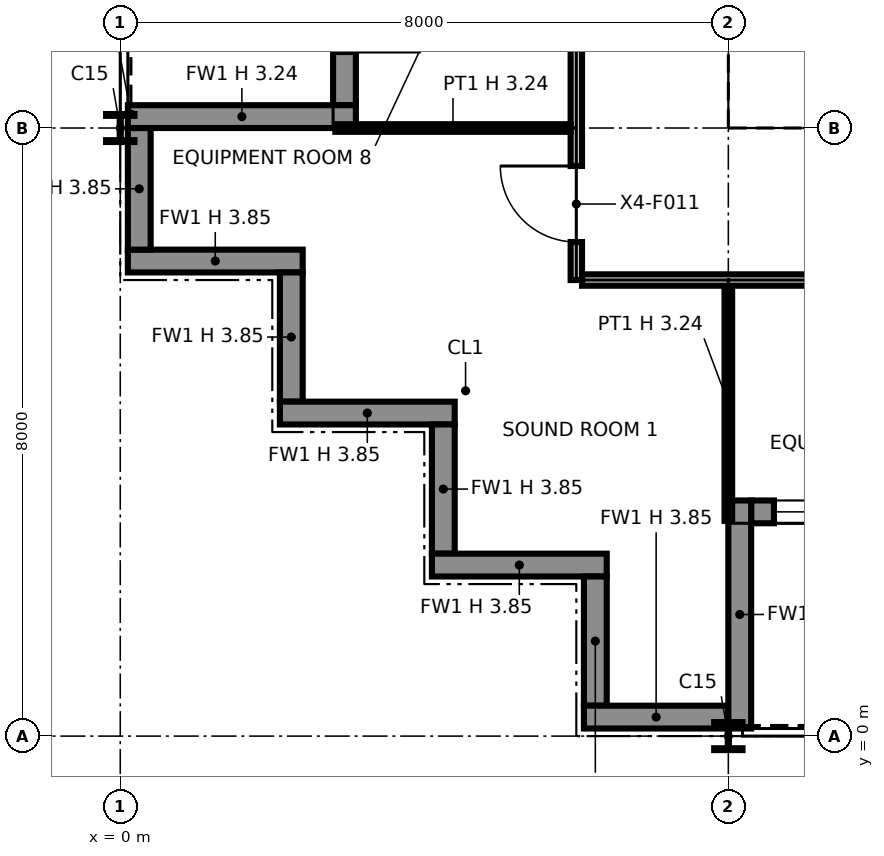
"""IFC4 building model, lengths in metres.
Left out: names, types, materials, properties, quantities, classifications, styles, units other than length and angle.
Written with IfcOpenShell. Run it as: python <this file> out.ifc"""

import sys

from ifc_helpers import new_model, si_unit, direction, frame, frame_2d, origin, origin_2d, place, context, subcontext, project, spatial, polyline, rectangle, i_section, outline, extrude, element, fill, save


model = new_model("IFC4")
c1 = context("Model", 3, precision=1e-05, world=origin(), true_north=direction((0.0, 1.0)))
c2 = subcontext(c1, "Body", "Model", "MODEL_VIEW")
j1 = project(units=[si_unit("LENGTHUNIT", "METRE"), si_unit("PLANEANGLEUNIT", "RADIAN")], contexts=[c1])
p1 = place(None, origin())
s1 = spatial("IfcSite", under=j1, at=p1, CompositionType="ELEMENT")
p2 = place(p1, origin())
s2 = spatial("IfcBuilding", under=s1, at=p2, CompositionType="ELEMENT")
p3 = place(p2, frame((0.0, 0.0, 275.0)))
s3 = spatial("IfcBuildingStorey", under=s2, at=p3, CompositionType="ELEMENT", Elevation=275.0)
for number, where, z_axis, x_axis in (
    (1, (0.0, 8.0, 0.0), (0.0, 0.0, 1.0), (1.0, 0.0, 0.0)),
    (2, (8.0, 0.0, 0.0), (0.0, 0.0, 1.0), (1.0, 0.0, 0.0)),
):
    element("IfcColumn", number, at=place(p3, frame(where, z_axis=z_axis, x_axis=x_axis)), inside=s3, PredefinedType="COLUMN", context=c2, shape_type="SweptSolid", body=[
        extrude(i_section(OverallWidth=0.373, OverallDepth=0.368, WebThickness=0.015, FlangeThickness=0.024, at=origin_2d()), origin(), (0.0, 0.0, 1.0), 3.85),
    ])
p4 = place(p3, frame((8.0, 8.0, 0.0), z_axis=(0.0, 0.0, 1.0), x_axis=(1.0, 0.0, 0.0)))
e3 = element("IfcColumn", 3, at=p4, inside=s3, PredefinedType="COLUMN", context=c2, shape_type="SweptSolid", body=[
    extrude(i_section(OverallWidth=0.257, OverallDepth=0.363, WebThickness=0.013, FlangeThickness=0.022, at=origin_2d()), origin(), (0.0, 0.0, 1.0), 3.85),
])
p5 = place(p3, frame((0.1, 6.25, 0.0), z_axis=(0.0, 0.0, 1.0), x_axis=(1.0, 0.0, 0.0)))
e4 = element("IfcWall", 4, at=p5, inside=s3, PredefinedType="SOLIDWALL", context=c2, shape_type="SweptSolid", body=[
    extrude(rectangle(XDim=2.3, YDim=0.3, at=frame_2d((1.15, 0.0))), origin(), (0.0, 0.0, 1.0), 3.85),
])
p6 = place(p3, frame((2.25, 6.1, 0.0), z_axis=(0.0, 0.0, 1.0), x_axis=(0.0, -1.0, 0.0)))
e5 = element("IfcWall", 5, at=p6, inside=s3, PredefinedType="SOLIDWALL", context=c2, shape_type="SweptSolid", body=[
    extrude(rectangle(XDim=1.7, YDim=0.3, at=frame_2d((0.85, 0.0))), origin(), (0.0, 0.0, 1.0), 3.85),
])
p7 = place(p3, frame((2.1, 4.25, 0.0), z_axis=(0.0, 0.0, 1.0), x_axis=(1.0, 0.0, 0.0)))
e6 = element("IfcWall", 6, at=p7, inside=s3, PredefinedType="SOLIDWALL", context=c2, shape_type="SweptSolid", body=[
    extrude(rectangle(XDim=2.3, YDim=0.3, at=frame_2d((1.15, 0.0))), origin(), (0.0, 0.0, 1.0), 3.85),
])
p8 = place(p3, frame((4.25, 4.1, 0.0), z_axis=(0.0, 0.0, 1.0), x_axis=(0.0, -1.0, 0.0)))
e7 = element("IfcWall", 7, at=p8, inside=s3, PredefinedType="SOLIDWALL", context=c2, shape_type="SweptSolid", body=[
    extrude(rectangle(XDim=1.7, YDim=0.3, at=frame_2d((0.85, 0.0))), origin(), (0.0, 0.0, 1.0), 3.85),
])
p9 = place(p3, frame((4.1, 2.25, 0.0), z_axis=(0.0, 0.0, 1.0), x_axis=(1.0, 0.0, 0.0)))
e8 = element("IfcWall", 8, at=p9, inside=s3, PredefinedType="SOLIDWALL", context=c2, shape_type="SweptSolid", body=[
    extrude(rectangle(XDim=2.3, YDim=0.3, at=frame_2d((1.15, 0.0))), origin(), (0.0, 0.0, 1.0), 3.85),
])
p10 = place(p3, frame((6.25, 2.1, 0.0), z_axis=(0.0, 0.0, 1.0), x_axis=(0.0, -1.0, 0.0)))
e9 = element("IfcWall", 9, at=p10, inside=s3, PredefinedType="SOLIDWALL", context=c2, shape_type="SweptSolid", body=[
    extrude(rectangle(XDim=1.7, YDim=0.3, at=frame_2d((0.85, 0.0))), origin(), (0.0, 0.0, 1.0), 3.85),
])
p11 = place(p3, frame((6.1, 0.25, 0.0), z_axis=(0.0, 0.0, 1.0), x_axis=(1.0, 0.0, 0.0)))
e10 = element("IfcWall", 10, at=p11, inside=s3, PredefinedType="SOLIDWALL", context=c2, shape_type="SweptSolid", body=[
    extrude(rectangle(XDim=1.9, YDim=0.3, at=frame_2d((0.95, 0.0))), origin(), (0.0, 0.0, 1.0), 3.85),
])
p12 = place(p3, frame((8.3, 2.95, 0.0), z_axis=(0.0, 0.0, 1.0), x_axis=(1.0, 0.0, 0.0)))
e11 = element("IfcWall", 11, at=p12, inside=s3, PredefinedType="SOLIDWALL", context=c2, shape_type="SweptSolid", body=[
    extrude(rectangle(XDim=7.4, YDim=0.3, at=frame_2d((3.7, 0.0))), origin(), (0.0, 0.0, 1.0), 3.85),
])
p13 = place(p12, frame((0.3, 0.0, 0.9)))
e12 = element("IfcOpeningElement", 12, at=p13, cuts=e11, PredefinedType="OPENING", context=c2, shape_type="SweptSolid", body=[
    extrude(rectangle(XDim=2.8, YDim=2.2, at=frame_2d((1.4, 1.1))), frame((0.0, 0.16, 0.0), z_axis=(0.0, -1.0, 0.0), x_axis=(1.0, 0.0, 0.0)), (0.0, 0.0, 1.0), 0.32),
])
p14 = place(p12, frame((4.7, 0.0, 0.0)))
e13 = element("IfcOpeningElement", 13, at=p14, cuts=e11, PredefinedType="OPENING", context=c2, shape_type="SweptSolid", body=[
    extrude(rectangle(XDim=2.0, YDim=2.4, at=frame_2d((1.0, 1.2))), frame((0.0, 0.16, 0.0), z_axis=(0.0, -1.0, 0.0), x_axis=(1.0, 0.0, 0.0)), (0.0, 0.0, 1.0), 0.32),
])
p15 = place(p3, frame((8.15, 0.1, 0.0), z_axis=(0.0, 0.0, 1.0), x_axis=(0.0, 1.0, 0.0)))
e14 = element("IfcWall", 14, at=p15, inside=s3, PredefinedType="SOLIDWALL", context=c2, shape_type="SweptSolid", body=[
    extrude(rectangle(XDim=3.0, YDim=0.3, at=frame_2d((1.5, 0.0))), origin(), (0.0, 0.0, 1.0), 3.237),
])
p16 = place(p3, frame((2.95, 15.7, 0.0), z_axis=(0.0, 0.0, 1.0), x_axis=(0.0, -1.0, 0.0)))
e15 = element("IfcWall", 15, at=p16, inside=s3, PredefinedType="SOLIDWALL", context=c2, shape_type="SweptSolid", body=[
    extrude(rectangle(XDim=7.4, YDim=0.3, at=frame_2d((3.7, 0.0))), origin(), (0.0, 0.0, 1.0), 3.85),
])
p17 = place(p16, frame((0.3, 0.0, 0.9)))
e16 = element("IfcOpeningElement", 16, at=p17, cuts=e15, PredefinedType="OPENING", context=c2, shape_type="SweptSolid", body=[
    extrude(rectangle(XDim=2.8, YDim=2.2, at=frame_2d((1.4, 1.1))), frame((0.0, 0.16, 0.0), z_axis=(0.0, -1.0, 0.0), x_axis=(1.0, 0.0, 0.0)), (0.0, 0.0, 1.0), 0.32),
])
p18 = place(p16, frame((4.7, 0.0, 0.0)))
e17 = element("IfcOpeningElement", 17, at=p18, cuts=e15, PredefinedType="OPENING", context=c2, shape_type="SweptSolid", body=[
    extrude(rectangle(XDim=2.0, YDim=2.4, at=frame_2d((1.0, 1.2))), frame((0.0, 0.16, 0.0), z_axis=(0.0, -1.0, 0.0), x_axis=(1.0, 0.0, 0.0)), (0.0, 0.0, 1.0), 0.32),
])
p19 = place(p3, frame((0.1, 8.15, 0.0), z_axis=(0.0, 0.0, 1.0), x_axis=(1.0, 0.0, 0.0)))
e18 = element("IfcWall", 18, at=p19, inside=s3, PredefinedType="SOLIDWALL", context=c2, shape_type="SweptSolid", body=[
    extrude(rectangle(XDim=3.0, YDim=0.3, at=frame_2d((1.5, 0.0))), origin(), (0.0, 0.0, 1.0), 3.237),
])
p20 = place(p3, frame((0.25, 8.0, 0.0), z_axis=(0.0, 0.0, 1.0), x_axis=(0.0, -1.0, 0.0)))
e19 = element("IfcWall", 19, at=p20, inside=s3, PredefinedType="SOLIDWALL", context=c2, shape_type="SweptSolid", body=[
    extrude(rectangle(XDim=1.6, YDim=0.3, at=frame_2d((0.8, 0.0))), origin(), (0.0, 0.0, 1.0), 3.85),
])
p21 = place(p3, frame((8.65, 8.75, 0.0), z_axis=(0.0, 0.0, 1.0), x_axis=(1.0, 0.0, 0.0)))
e20 = element("IfcWall", 20, at=p21, inside=s3, PredefinedType="PARTITIONING", context=c2, shape_type="SweptSolid", body=[
    extrude(outline(polyline([(0.0, 0.0), (14.7, 0.0), (14.7, 3.85), (7.438, 3.85), (7.437, 3.318), (7.263, 3.318), (7.262, 3.85), (0.0, 3.85), (0.0, 0.0)])), frame((0.0, 0.1, 0.0), z_axis=(0.0, -1.0, 0.0), x_axis=(1.0, 0.0, 0.0)), (0.0, 0.0, 1.0), 0.2),
])
p22 = place(p21, frame((1.3, 0.0, 0.0)))
e21 = element("IfcOpeningElement", 21, at=p22, cuts=e20, PredefinedType="OPENING", context=c2, shape_type="SweptSolid", body=[
    extrude(rectangle(XDim=1.4, YDim=2.1, at=frame_2d((0.7, 1.05))), frame((0.0, 0.11, 0.0), z_axis=(0.0, -1.0, 0.0), x_axis=(1.0, 0.0, 0.0)), (0.0, 0.0, 1.0), 0.22),
])
p23 = place(p21, frame((4.6, 0.0, 0.0)))
e22 = element("IfcOpeningElement", 22, at=p23, cuts=e20, PredefinedType="OPENING", context=c2, shape_type="SweptSolid", body=[
    extrude(rectangle(XDim=1.4, YDim=2.1, at=frame_2d((0.7, 1.05))), frame((0.0, 0.11, 0.0), z_axis=(0.0, -1.0, 0.0), x_axis=(1.0, 0.0, 0.0)), (0.0, 0.0, 1.0), 0.22),
])
p24 = place(p21, frame((10.4, 0.0, 0.0)))
e23 = element("IfcOpeningElement", 23, at=p24, cuts=e20, PredefinedType="OPENING", context=c2, shape_type="SweptSolid", body=[
    extrude(rectangle(XDim=1.2, YDim=2.1, at=frame_2d((0.6, 1.05))), frame((0.0, 0.11, 0.0), z_axis=(0.0, -1.0, 0.0), x_axis=(1.0, 0.0, 0.0)), (0.0, 0.0, 1.0), 0.22),
])
p25 = place(p3, frame((8.75, 8.85, 0.0), z_axis=(0.0, 0.0, 1.0), x_axis=(0.0, 1.0, 0.0)))
e24 = element("IfcWall", 24, at=p25, inside=s3, PredefinedType="PARTITIONING", context=c2, shape_type="SweptSolid", body=[
    extrude(outline(polyline([(0.0, 0.0), (14.3, 0.0), (14.3, 3.85), (10.225, 3.85), (10.224, 3.44), (10.076, 3.44), (10.075, 3.85), (7.238, 3.85), (7.237, 3.318), (7.063, 3.318), (7.062, 3.85), (0.0, 3.85), (0.0, 0.0)])), frame((0.0, 0.1, 0.0), z_axis=(0.0, -1.0, 0.0), x_axis=(1.0, 0.0, 0.0)), (0.0, 0.0, 1.0), 0.2),
])
p26 = place(p25, frame((8.3, 0.0, 0.0)))
e25 = element("IfcOpeningElement", 25, at=p26, cuts=e24, PredefinedType="OPENING", context=c2, shape_type="SweptSolid", body=[
    extrude(rectangle(XDim=1.8, YDim=2.1, at=frame_2d((0.9, 1.05))), frame((0.0, 0.11, 0.0), z_axis=(0.0, -1.0, 0.0), x_axis=(1.0, 0.0, 0.0)), (0.0, 0.0, 1.0), 0.22),
])
p27 = place(p3, frame((8.0, 2.83, 0.0), z_axis=(0.0, 0.0, 1.0), x_axis=(0.0, 1.0, 0.0)))
e26 = element("IfcWall", 26, at=p27, inside=s3, PredefinedType="PARTITIONING", context=c2, shape_type="SweptSolid", body=[
    extrude(rectangle(XDim=3.095, YDim=0.1, at=frame_2d((1.547, 0.0))), origin(), (0.0, 0.0, 1.0), 3.238),
])
p28 = place(p3, frame((6.075, 6.0, 0.0), z_axis=(0.0, 0.0, 1.0), x_axis=(1.0, 0.0, 0.0)))
e27 = element("IfcWall", 27, at=p28, inside=s3, PredefinedType="PARTITIONING", context=c2, shape_type="SweptSolid", body=[
    extrude(rectangle(XDim=35.85, YDim=0.15, at=frame_2d((17.925, 0.0))), origin(), (0.0, 0.0, 1.0), 3.85),
])
p29 = place(p28, frame((12.425, 0.0, 0.0), z_axis=(0.0, 0.0, 1.0), x_axis=(-1.0, 0.0, 0.0)))
e28 = element("IfcOpeningElement", 28, at=p29, cuts=e27, PredefinedType="OPENING", context=c2, shape_type="SweptSolid", body=[
    extrude(rectangle(XDim=1.0, YDim=2.1, at=frame_2d((0.5, 1.05))), frame((0.0, 0.085, 0.0), z_axis=(0.0, -1.0, 0.0), x_axis=(1.0, 0.0, 0.0)), (0.0, 0.0, 1.0), 0.17),
])
p30 = place(p28, frame((16.425, 0.0, 0.0), z_axis=(0.0, 0.0, 1.0), x_axis=(-1.0, 0.0, 0.0)))
e29 = element("IfcOpeningElement", 29, at=p30, cuts=e27, PredefinedType="OPENING", context=c2, shape_type="SweptSolid", body=[
    extrude(rectangle(XDim=1.0, YDim=2.1, at=frame_2d((0.5, 1.05))), frame((0.0, 0.085, 0.0), z_axis=(0.0, -1.0, 0.0), x_axis=(1.0, 0.0, 0.0)), (0.0, 0.0, 1.0), 0.17),
])
p31 = place(p28, frame((30.425, 0.0, 0.0), z_axis=(0.0, 0.0, 1.0), x_axis=(-1.0, 0.0, 0.0)))
e30 = element("IfcOpeningElement", 30, at=p31, cuts=e27, PredefinedType="OPENING", context=c2, shape_type="SweptSolid", body=[
    extrude(rectangle(XDim=1.0, YDim=2.1, at=frame_2d((0.5, 1.05))), frame((0.0, 0.085, 0.0), z_axis=(0.0, -1.0, 0.0), x_axis=(1.0, 0.0, 0.0)), (0.0, 0.0, 1.0), 0.17),
])
p32 = place(p28, frame((4.425, 0.0, 0.0), z_axis=(0.0, 0.0, 1.0), x_axis=(-1.0, 0.0, 0.0)))
e31 = element("IfcOpeningElement", 31, at=p32, cuts=e27, PredefinedType="OPENING", context=c2, shape_type="SweptSolid", body=[
    extrude(rectangle(XDim=1.0, YDim=2.1, at=frame_2d((0.5, 1.05))), frame((0.0, 0.085, 0.0), z_axis=(0.0, -1.0, 0.0), x_axis=(1.0, 0.0, 0.0)), (0.0, 0.0, 1.0), 0.17),
])
p33 = place(p28, frame((8.425, 0.0, 0.0), z_axis=(0.0, 0.0, 1.0), x_axis=(-1.0, 0.0, 0.0)))
e32 = element("IfcOpeningElement", 32, at=p33, cuts=e27, PredefinedType="OPENING", context=c2, shape_type="SweptSolid", body=[
    extrude(rectangle(XDim=1.0, YDim=2.1, at=frame_2d((0.5, 1.05))), frame((0.0, 0.085, 0.0), z_axis=(0.0, -1.0, 0.0), x_axis=(1.0, 0.0, 0.0)), (0.0, 0.0, 1.0), 0.17),
])
p34 = place(p28, frame((19.425, 0.0, 0.0), z_axis=(0.0, 0.0, 1.0), x_axis=(-1.0, 0.0, 0.0)))
e33 = element("IfcOpeningElement", 33, at=p34, cuts=e27, PredefinedType="OPENING", context=c2, shape_type="SweptSolid", body=[
    extrude(rectangle(XDim=1.0, YDim=2.1, at=frame_2d((0.5, 1.05))), frame((0.0, 0.085, 0.0), z_axis=(0.0, -1.0, 0.0), x_axis=(1.0, 0.0, 0.0)), (0.0, 0.0, 1.0), 0.17),
])
p35 = place(p28, frame((24.425, 0.0, 0.0), z_axis=(0.0, 0.0, 1.0), x_axis=(-1.0, 0.0, 0.0)))
e34 = element("IfcOpeningElement", 34, at=p35, cuts=e27, PredefinedType="OPENING", context=c2, shape_type="SweptSolid", body=[
    extrude(rectangle(XDim=1.0, YDim=2.1, at=frame_2d((0.5, 1.05))), frame((0.0, 0.085, 0.0), z_axis=(0.0, -1.0, 0.0), x_axis=(1.0, 0.0, 0.0)), (0.0, 0.0, 1.0), 0.17),
])
p36 = place(p3, frame((6.0, 6.0, 0.0), z_axis=(0.0, 0.0, 1.0), x_axis=(0.0, 1.0, 0.0)))
e35 = element("IfcWall", 35, at=p36, inside=s3, PredefinedType="PARTITIONING", context=c2, shape_type="SweptSolid", body=[
    extrude(outline(polyline([(0.0, 0.0), (13.375, 0.0), (13.375, 3.85), (10.3, 3.85), (10.298, 3.238), (9.702, 3.238), (9.7, 3.85), (6.3, 3.85), (6.298, 3.238), (5.702, 3.238), (5.7, 3.85), (2.3, 3.85), (2.298, 3.238), (1.702, 3.238), (1.7, 3.85), (0.0, 3.85), (0.0, 0.0)])), frame((0.0, 0.075, 0.0), z_axis=(0.0, -1.0, 0.0), x_axis=(1.0, 0.0, 0.0)), (0.0, 0.0, 1.0), 0.15),
])
p37 = place(p36, frame((0.5, 0.0, 0.0)))
e36 = element("IfcOpeningElement", 36, at=p37, cuts=e35, PredefinedType="OPENING", context=c2, shape_type="SweptSolid", body=[
    extrude(rectangle(XDim=1.0, YDim=2.1, at=frame_2d((0.5, 1.05))), frame((0.0, 0.085, 0.0), z_axis=(0.0, -1.0, 0.0), x_axis=(1.0, 0.0, 0.0)), (0.0, 0.0, 1.0), 0.17),
])
p38 = place(p36, frame((3.5, 0.0, 0.0)))
e37 = element("IfcOpeningElement", 37, at=p38, cuts=e35, PredefinedType="OPENING", context=c2, shape_type="SweptSolid", body=[
    extrude(rectangle(XDim=1.0, YDim=2.1, at=frame_2d((0.5, 1.05))), frame((0.0, 0.085, 0.0), z_axis=(0.0, -1.0, 0.0), x_axis=(1.0, 0.0, 0.0)), (0.0, 0.0, 1.0), 0.17),
])
p39 = place(p36, frame((7.5, 0.0, 0.0)))
e38 = element("IfcOpeningElement", 38, at=p39, cuts=e35, PredefinedType="OPENING", context=c2, shape_type="SweptSolid", body=[
    extrude(rectangle(XDim=1.0, YDim=2.1, at=frame_2d((0.5, 1.05))), frame((0.0, 0.085, 0.0), z_axis=(0.0, -1.0, 0.0), x_axis=(1.0, 0.0, 0.0)), (0.0, 0.0, 1.0), 0.17),
])
p40 = place(p36, frame((11.225, 0.0, 0.0)))
e39 = element("IfcOpeningElement", 39, at=p40, cuts=e35, PredefinedType="OPENING", context=c2, shape_type="SweptSolid", body=[
    extrude(rectangle(XDim=1.0, YDim=2.1, at=frame_2d((0.5, 1.05))), frame((0.0, 0.085, 0.0), z_axis=(0.0, -1.0, 0.0), x_axis=(1.0, 0.0, 0.0)), (0.0, 0.0, 1.0), 0.17),
])
p41 = place(p3, frame((2.83, 8.0, 0.0), z_axis=(0.0, 0.0, 1.0), x_axis=(1.0, 0.0, 0.0)))
e40 = element("IfcWall", 40, at=p41, inside=s3, PredefinedType="PARTITIONING", context=c2, shape_type="SweptSolid", body=[
    extrude(rectangle(XDim=3.095, YDim=0.1, at=frame_2d((1.547, 0.0))), origin(), (0.0, 0.0, 1.0), 3.238),
])
p42 = place(p13, origin())
e41 = element("IfcWindow", 41, at=p42, inside=s3, PartitioningType="SINGLE_PANEL", PredefinedType="WINDOW", context=c2, shape_type="SweptSolid", body=[
    extrude(rectangle(XDim=2.8, YDim=2.2, at=frame_2d((1.4, 1.1))), frame((0.0, 0.03, 0.0), z_axis=(0.0, -1.0, 0.0), x_axis=(1.0, 0.0, 0.0)), (0.0, 0.0, 1.0), 0.06),
])
fill(e12, e41)
p43 = place(p37, origin())
e42 = element("IfcDoor", 42, at=p43, inside=s3, OperationType="SINGLE_SWING_RIGHT", PredefinedType="DOOR", context=c2, shape_type="SweptSolid", body=[
    extrude(rectangle(XDim=1.0, YDim=2.1, at=frame_2d((0.5, 1.05))), frame((0.0, 0.025, 0.0), z_axis=(0.0, -1.0, 0.0), x_axis=(1.0, 0.0, 0.0)), (0.0, 0.0, 1.0), 0.05),
])
fill(e36, e42)
save(model, sys.argv[1])
